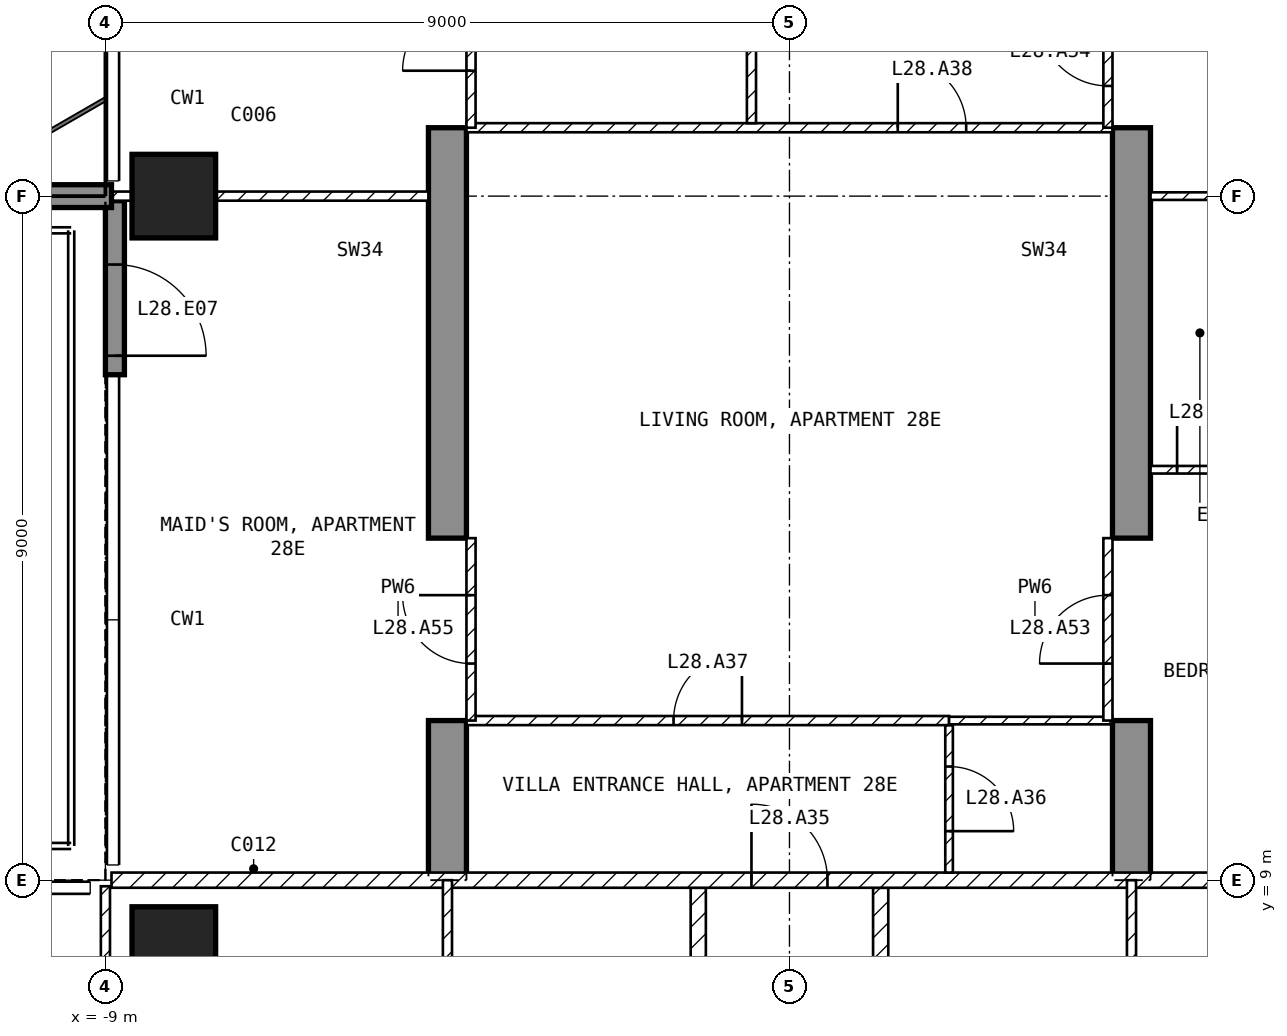
"""IFC4 building model, lengths in metres.
Left out: names, types, materials, properties, quantities, classifications, styles, units other than length and angle.
Written with IfcOpenShell. Run it as: python <this file> out.ifc"""

import sys

from ifc_helpers import new_model, si_unit, direction, frame, frame_2d, origin, origin_2d, place, context, subcontext, project, spatial, polyline, rectangle, outline, extrude, element, fill, save


model = new_model("IFC4")
c1 = context("Model", 3, precision=1e-05, world=origin(), true_north=direction((0.0, 1.0)))
c2 = subcontext(c1, "Body", "Model", "MODEL_VIEW")
j1 = project(units=[si_unit("LENGTHUNIT", "METRE"), si_unit("PLANEANGLEUNIT", "RADIAN")], contexts=[c1])
p1 = place(None, origin())
s1 = spatial("IfcSite", under=j1, at=p1, CompositionType="ELEMENT")
p2 = place(p1, origin())
s2 = spatial("IfcBuilding", under=s1, at=p2, CompositionType="ELEMENT")
p3 = place(p2, frame((0.0, 0.0, 119.9)))
s3 = spatial("IfcBuildingStorey", under=s2, at=p3, CompositionType="ELEMENT", Elevation=119.9)
for number, where, z_axis, x_axis in (
    (1, (-8.1, 8.1, -0.25), (0.0, 0.0, 1.0), (1.0, 0.0, 0.0)),
    (2, (-8.1, 18.0, -0.25), (0.0, 0.0, 1.0), (1.0, 0.0, 0.0)),
):
    element("IfcColumn", number, at=place(p3, frame(where, z_axis=z_axis, x_axis=x_axis)), inside=s3, PredefinedType="COLUMN", context=c2, shape_type="SweptSolid", body=[
        extrude(rectangle(XDim=1.1, YDim=1.1, at=origin_2d()), origin(), (0.0, 0.0, 1.0), 3.5),
    ])
for number, where, z_axis, x_axis in (
    (3, (-4.75, 9.0, -0.25), (1.0, 0.0, 0.0), (0.0, 1.0, 0.0)),
    (4, (4.25, 9.0, -0.25), (1.0, 0.0, 0.0), (0.0, 1.0, 0.0)),
):
    element("IfcWall", number, at=place(p3, frame(where, z_axis=z_axis, x_axis=x_axis)), inside=s3, PredefinedType="SHEAR", context=c2, shape_type="SweptSolid", body=[
        extrude(outline(polyline([(0.0, 0.0), (2.1, 0.0), (2.1, 2.65), (4.5, 2.65), (4.5, 0.0), (9.9, 0.0), (9.9, 2.65), (12.3, 2.65), (12.3, 0.0), (16.55, 0.0), (16.55, 3.5), (0.0, 3.5), (0.0, 0.0)])), origin(), (0.0, 0.0, 1.0), 0.5),
    ])
p4 = place(p3, frame((-8.875, 17.94, 0.0), z_axis=(0.0, 0.0, 1.0), x_axis=(0.0, -1.0, 0.0)))
e5 = element("IfcWall", 5, at=p4, inside=s3, PredefinedType="SOLIDWALL", context=c2, shape_type="SweptSolid", body=[
    extrude(rectangle(XDim=2.29, YDim=0.25, at=frame_2d((1.145, 0.0))), origin(), (0.0, 0.0, 1.0), 3.25),
])
p5 = place(p4, frame((0.84, 0.0, 0.0)))
e6 = element("IfcOpeningElement", 6, at=p5, cuts=e5, PredefinedType="OPENING", context=c2, shape_type="SweptSolid", body=[
    extrude(rectangle(XDim=1.2, YDim=2.4, at=frame_2d((0.6, 1.2))), frame((0.0, 0.135, 0.0), z_axis=(0.0, -1.0, 0.0), x_axis=(1.0, 0.0, 0.0)), (0.0, 0.0, 1.0), 0.27),
])
p6 = place(p3, frame((-8.92, 18.0, 0.0), z_axis=(0.0, 0.0, 1.0), x_axis=(-1.0, 0.0, 0.0)))
e7 = element("IfcWall", 7, at=p6, inside=s3, PredefinedType="SOLIDWALL", context=c2, shape_type="SweptSolid", body=[
    extrude(rectangle(XDim=2.82, YDim=0.3, at=frame_2d((1.41, 0.0))), origin(), (0.0, 0.0, 1.0), 3.25),
])
for number, where, z_axis, x_axis in (
    (8, (1.2, 8.9, 0.0), (0.0, 0.0, 1.0), (0.0, -1.0, 0.0)),
    (9, (-1.2, 4.6, 0.0), (0.0, 0.0, 1.0), (0.0, 1.0, 0.0)),
):
    element("IfcWall", number, at=place(p3, frame(where, z_axis=z_axis, x_axis=x_axis)), inside=s3, PredefinedType="PARTITIONING", context=c2, shape_type="SweptSolid", body=[
        extrude(rectangle(XDim=4.3, YDim=0.2, at=frame_2d((2.15, 0.0))), origin(), (0.0, 0.0, 1.0), 3.25),
    ])
p7 = place(p3, frame((-8.92, 9.0, 0.0), z_axis=(0.0, 0.0, 1.0), x_axis=(1.0, 0.0, 0.0)))
e10 = element("IfcWall", 10, at=p7, inside=s3, PredefinedType="PARTITIONING", context=c2, shape_type="SweptSolid", body=[
    extrude(rectangle(XDim=17.84, YDim=0.2, at=frame_2d((8.92, 0.0))), origin(), (0.0, 0.0, 1.0), 3.25),
])
p8 = place(p7, frame((8.42, 0.0, 0.0)))
e11 = element("IfcOpeningElement", 11, at=p8, cuts=e10, PredefinedType="OPENING", context=c2, shape_type="SweptSolid", body=[
    extrude(rectangle(XDim=1.0, YDim=2.1, at=frame_2d((0.5, 1.05))), frame((0.0, 0.11, 0.0), z_axis=(0.0, -1.0, 0.0), x_axis=(1.0, 0.0, 0.0)), (0.0, 0.0, 1.0), 0.22),
])
p9 = place(p3, frame((4.5, 4.5, 0.0), z_axis=(0.0, 0.0, 1.0), x_axis=(0.0, 1.0, 0.0)))
e12 = element("IfcWall", 12, at=p9, inside=s3, PredefinedType="PARTITIONING", context=c2, shape_type="SweptSolid", body=[
    extrude(rectangle(XDim=4.5, YDim=0.12, at=frame_2d((2.25, 0.0))), origin(), (0.0, 0.0, 1.0), 3.25),
])
p10 = place(p9, frame((0.24, 0.0, 0.0)))
e13 = element("IfcOpeningElement", 13, at=p10, cuts=e12, PredefinedType="OPENING", context=c2, shape_type="SweptSolid", body=[
    extrude(rectangle(XDim=0.9, YDim=2.1, at=frame_2d((0.45, 1.05))), frame((0.0, 0.07, 0.0), z_axis=(0.0, -1.0, 0.0), x_axis=(1.0, 0.0, 0.0)), (0.0, 0.0, 1.0), 0.14),
])
p11 = place(p3, frame((-9.0, 8.92, 0.0), z_axis=(0.0, 0.0, 1.0), x_axis=(0.0, -1.0, 0.0)))
e14 = element("IfcWall", 14, at=p11, inside=s3, PredefinedType="PARTITIONING", context=c2, shape_type="SweptSolid", body=[
    extrude(rectangle(XDim=7.62, YDim=0.12, at=frame_2d((3.81, 0.0))), origin(), (0.0, 0.0, 1.0), 3.25),
])
p12 = place(p11, frame((2.52, 0.0, 0.0)))
e15 = element("IfcOpeningElement", 15, at=p12, cuts=e14, PredefinedType="OPENING", context=c2, shape_type="SweptSolid", body=[
    extrude(rectangle(XDim=0.9, YDim=2.1, at=frame_2d((0.45, 1.05))), frame((0.0, 0.07, 0.0), z_axis=(0.0, -1.0, 0.0), x_axis=(1.0, 0.0, 0.0)), (0.0, 0.0, 1.0), 0.14),
])
p13 = place(p3, frame((-4.5, 9.0, 0.0), z_axis=(0.0, 0.0, 1.0), x_axis=(0.0, -1.0, 0.0)))
e16 = element("IfcWall", 16, at=p13, inside=s3, PredefinedType="PARTITIONING", context=c2, shape_type="SweptSolid", body=[
    extrude(rectangle(XDim=4.5, YDim=0.12, at=frame_2d((2.25, 0.0))), origin(), (0.0, 0.0, 1.0), 3.25),
])
p14 = place(p13, frame((1.8, 0.0, 0.0)))
e17 = element("IfcOpeningElement", 17, at=p14, cuts=e16, PredefinedType="OPENING", context=c2, shape_type="SweptSolid", body=[
    extrude(rectangle(XDim=0.9, YDim=2.1, at=frame_2d((0.45, 1.05))), frame((0.0, 0.07, 0.0), z_axis=(0.0, -1.0, 0.0), x_axis=(1.0, 0.0, 0.0)), (0.0, 0.0, 1.0), 0.14),
])
p15 = place(p3, frame((2.1, 11.04, 0.0), z_axis=(0.0, 0.0, 1.0), x_axis=(0.0, -1.0, 0.0)))
e18 = element("IfcWall", 18, at=p15, inside=s3, PredefinedType="PARTITIONING", context=c2, shape_type="SweptSolid", body=[
    extrude(rectangle(XDim=1.94, YDim=0.1, at=frame_2d((0.97, 0.0))), origin(), (0.0, 0.0, 1.0), 3.25),
])
p16 = place(p15, frame((0.545, 0.0, 0.0)))
e19 = element("IfcOpeningElement", 19, at=p16, cuts=e18, PredefinedType="OPENING", context=c2, shape_type="SweptSolid", body=[
    extrude(rectangle(XDim=0.85, YDim=2.1, at=frame_2d((0.425, 1.05))), frame((0.0, 0.06, 0.0), z_axis=(0.0, -1.0, 0.0), x_axis=(1.0, 0.0, 0.0)), (0.0, 0.0, 1.0), 0.12),
])
p17 = place(p3, frame((-4.25, 11.1, 0.0), z_axis=(0.0, 0.0, 1.0), x_axis=(1.0, 0.0, 0.0)))
e20 = element("IfcWall", 20, at=p17, inside=s3, PredefinedType="PARTITIONING", context=c2, shape_type="SweptSolid", body=[
    extrude(rectangle(XDim=6.35, YDim=0.12, at=frame_2d((3.175, 0.0))), origin(), (0.0, 0.0, 1.0), 3.25),
])
p18 = place(p17, frame((2.725, 0.0, 0.0)))
e21 = element("IfcOpeningElement", 21, at=p18, cuts=e20, PredefinedType="OPENING", context=c2, shape_type="SweptSolid", body=[
    extrude(rectangle(XDim=0.9, YDim=2.1, at=frame_2d((0.45, 1.05))), frame((0.0, 0.07, 0.0), z_axis=(0.0, -1.0, 0.0), x_axis=(1.0, 0.0, 0.0)), (0.0, 0.0, 1.0), 0.14),
])
p19 = place(p3, frame((2.1, 11.1, 0.0), z_axis=(0.0, 0.0, 1.0), x_axis=(1.0, 0.0, 0.0)))
e22 = element("IfcWall", 22, at=p19, inside=s3, PredefinedType="PARTITIONING", context=c2, shape_type="SweptSolid", body=[
    extrude(rectangle(XDim=2.15, YDim=0.1, at=frame_2d((1.075, 0.0))), origin(), (0.0, 0.0, 1.0), 3.25),
])
p20 = place(p3, frame((-4.25, 18.9, 0.0), z_axis=(0.0, 0.0, 1.0), x_axis=(1.0, 0.0, 0.0)))
e23 = element("IfcWall", 23, at=p20, inside=s3, PredefinedType="PARTITIONING", context=c2, shape_type="SweptSolid", body=[
    extrude(rectangle(XDim=8.5, YDim=0.12, at=frame_2d((4.25, 0.0))), origin(), (0.0, 0.0, 1.0), 3.25),
])
p21 = place(p20, frame((5.675, 0.0, 0.0)))
e24 = element("IfcOpeningElement", 24, at=p21, cuts=e23, PredefinedType="OPENING", context=c2, shape_type="SweptSolid", body=[
    extrude(rectangle(XDim=0.9, YDim=2.1, at=frame_2d((0.45, 1.05))), frame((0.0, 0.07, 0.0), z_axis=(0.0, -1.0, 0.0), x_axis=(1.0, 0.0, 0.0)), (0.0, 0.0, 1.0), 0.14),
])
p22 = place(p3, frame((-0.5, 18.96, 0.0), z_axis=(0.0, 0.0, 1.0), x_axis=(0.0, 1.0, 0.0)))
e25 = element("IfcWall", 25, at=p22, inside=s3, PredefinedType="PARTITIONING", context=c2, shape_type="SweptSolid", body=[
    extrude(rectangle(XDim=4.38, YDim=0.12, at=frame_2d((2.19, 0.0))), origin(), (0.0, 0.0, 1.0), 3.25),
])
p23 = place(p22, frame((1.74, 0.0, 0.0)))
e26 = element("IfcOpeningElement", 26, at=p23, cuts=e25, PredefinedType="OPENING", context=c2, shape_type="SweptSolid", body=[
    extrude(rectangle(XDim=0.9, YDim=2.1, at=frame_2d((0.45, 1.05))), frame((0.0, 0.07, 0.0), z_axis=(0.0, -1.0, 0.0), x_axis=(1.0, 0.0, 0.0)), (0.0, 0.0, 1.0), 0.14),
])
p24 = place(p3, frame((4.75, 14.4, 0.0), z_axis=(0.0, 0.0, 1.0), x_axis=(1.0, 0.0, 0.0)))
e27 = element("IfcWall", 27, at=p24, inside=s3, PredefinedType="PARTITIONING", context=c2, shape_type="SweptSolid", body=[
    extrude(rectangle(XDim=1.6, YDim=0.1, at=frame_2d((0.8, 0.0))), origin(), (0.0, 0.0, 1.0), 3.25),
])
p25 = place(p24, frame((0.35, 0.0, 0.0)))
e28 = element("IfcOpeningElement", 28, at=p25, cuts=e27, PredefinedType="OPENING", context=c2, shape_type="SweptSolid", body=[
    extrude(rectangle(XDim=0.85, YDim=2.1, at=frame_2d((0.425, 1.05))), frame((0.0, 0.06, 0.0), z_axis=(0.0, -1.0, 0.0), x_axis=(1.0, 0.0, 0.0)), (0.0, 0.0, 1.0), 0.12),
])
p26 = place(p3, frame((4.75, 18.0, 0.0), z_axis=(0.0, 0.0, 1.0), x_axis=(1.0, 0.0, 0.0)))
e29 = element("IfcWall", 29, at=p26, inside=s3, PredefinedType="PARTITIONING", context=c2, shape_type="SweptSolid", body=[
    extrude(rectangle(XDim=1.55, YDim=0.1, at=frame_2d((0.775, 0.0))), origin(), (0.0, 0.0, 1.0), 2.414),
])
p27 = place(p3, frame((-8.92, 18.0, 0.0), z_axis=(0.0, 0.0, 1.0), x_axis=(1.0, 0.0, 0.0)))
e30 = element("IfcWall", 30, at=p27, inside=s3, PredefinedType="PARTITIONING", context=c2, shape_type="SweptSolid", body=[
    extrude(rectangle(XDim=4.17, YDim=0.12, at=frame_2d((2.085, 0.0))), origin(), (0.0, 0.0, 1.0), 2.414),
])
p28 = place(p3, frame((4.19, 11.1, 0.0), z_axis=(0.0, 0.0, 1.0), x_axis=(0.0, 1.0, 0.0)))
e31 = element("IfcWall", 31, at=p28, inside=s3, PredefinedType="PARTITIONING", context=c2, shape_type="SweptSolid", body=[
    extrude(rectangle(XDim=2.4, YDim=0.12, at=frame_2d((1.2, 0.0))), origin(), (0.0, 0.0, 1.0), 2.4),
])
p29 = place(p28, frame((0.75, 0.0, 0.0)))
e32 = element("IfcOpeningElement", 32, at=p29, cuts=e31, PredefinedType="OPENING", context=c2, shape_type="SweptSolid", body=[
    extrude(rectangle(XDim=0.9, YDim=2.1, at=frame_2d((0.45, 1.05))), frame((0.0, 0.07, 0.0), z_axis=(0.0, -1.0, 0.0), x_axis=(1.0, 0.0, 0.0)), (0.0, 0.0, 1.0), 0.14),
])
p30 = place(p3, frame((4.19, 18.9, 0.0), z_axis=(0.0, 0.0, 1.0), x_axis=(0.0, 1.0, 0.0)))
e33 = element("IfcWall", 33, at=p30, inside=s3, PredefinedType="PARTITIONING", context=c2, shape_type="SweptSolid", body=[
    extrude(rectangle(XDim=2.4, YDim=0.12, at=frame_2d((1.2, 0.0))), origin(), (0.0, 0.0, 1.0), 2.4),
])
p31 = place(p30, frame((0.55, 0.0, 0.0)))
e34 = element("IfcOpeningElement", 34, at=p31, cuts=e33, PredefinedType="OPENING", context=c2, shape_type="SweptSolid", body=[
    extrude(rectangle(XDim=0.9, YDim=2.1, at=frame_2d((0.45, 1.05))), frame((0.0, 0.07, 0.0), z_axis=(0.0, -1.0, 0.0), x_axis=(1.0, 0.0, 0.0)), (0.0, 0.0, 1.0), 0.14),
])
p32 = place(p3, frame((-4.19, 11.1, 0.0), z_axis=(0.0, 0.0, 1.0), x_axis=(0.0, 1.0, 0.0)))
e35 = element("IfcWall", 35, at=p32, inside=s3, PredefinedType="PARTITIONING", context=c2, shape_type="SweptSolid", body=[
    extrude(rectangle(XDim=2.4, YDim=0.12, at=frame_2d((1.2, 0.0))), origin(), (0.0, 0.0, 1.0), 2.4),
])
p33 = place(p32, frame((0.75, 0.0, 0.0)))
e36 = element("IfcOpeningElement", 36, at=p33, cuts=e35, PredefinedType="OPENING", context=c2, shape_type="SweptSolid", body=[
    extrude(rectangle(XDim=0.9, YDim=2.1, at=frame_2d((0.45, 1.05))), frame((0.0, 0.07, 0.0), z_axis=(0.0, -1.0, 0.0), x_axis=(1.0, 0.0, 0.0)), (0.0, 0.0, 1.0), 0.14),
])
p34 = place(p3, frame((-4.19, 18.9, 0.0), z_axis=(0.0, 0.0, 1.0), x_axis=(0.0, 1.0, 0.0)))
e37 = element("IfcWall", 37, at=p34, inside=s3, PredefinedType="PARTITIONING", context=c2, shape_type="SweptSolid", body=[
    extrude(rectangle(XDim=2.4, YDim=0.12, at=frame_2d((1.2, 0.0))), origin(), (0.0, 0.0, 1.0), 2.4),
])
p35 = place(p34, frame((0.75, 0.0, 0.0)))
e38 = element("IfcOpeningElement", 38, at=p35, cuts=e37, PredefinedType="OPENING", context=c2, shape_type="SweptSolid", body=[
    extrude(rectangle(XDim=0.9, YDim=2.1, at=frame_2d((0.45, 1.05))), frame((0.0, 0.07, 0.0), z_axis=(0.0, -1.0, 0.0), x_axis=(1.0, 0.0, 0.0)), (0.0, 0.0, 1.0), 0.14),
])
p36 = place(p5, origin())
e39 = element("IfcDoor", 39, at=p36, inside=s3, OperationType="SINGLE_SWING_RIGHT", PredefinedType="DOOR", context=c2, shape_type="SweptSolid", body=[
    extrude(rectangle(XDim=1.2, YDim=2.4, at=frame_2d((0.6, 1.2))), frame((0.0, 0.025, 0.0), z_axis=(0.0, -1.0, 0.0), x_axis=(1.0, 0.0, 0.0)), (0.0, 0.0, 1.0), 0.05),
])
fill(e6, e39)
p37 = place(p8, origin())
e40 = element("IfcDoor", 40, at=p37, inside=s3, OperationType="SINGLE_SWING_LEFT", PredefinedType="DOOR", context=c2, shape_type="SweptSolid", body=[
    extrude(rectangle(XDim=1.0, YDim=2.1, at=frame_2d((0.5, 1.05))), frame((0.0, 0.025, 0.0), z_axis=(0.0, -1.0, 0.0), x_axis=(1.0, 0.0, 0.0)), (0.0, 0.0, 1.0), 0.05),
])
fill(e11, e40)
p38 = place(p16, origin())
e41 = element("IfcDoor", 41, at=p38, inside=s3, OperationType="SINGLE_SWING_RIGHT", PredefinedType="DOOR", context=c2, shape_type="SweptSolid", body=[
    extrude(rectangle(XDim=0.85, YDim=2.1, at=frame_2d((0.425, 1.05))), frame((0.0, 0.025, 0.0), z_axis=(0.0, -1.0, 0.0), x_axis=(1.0, 0.0, 0.0)), (0.0, 0.0, 1.0), 0.05),
])
fill(e19, e41)
p39 = place(p18, origin())
e42 = element("IfcDoor", 42, at=p39, inside=s3, OperationType="SINGLE_SWING_RIGHT", PredefinedType="DOOR", context=c2, shape_type="SweptSolid", body=[
    extrude(rectangle(XDim=0.9, YDim=2.1, at=frame_2d((0.45, 1.05))), frame((0.0, 0.025, 0.0), z_axis=(0.0, -1.0, 0.0), x_axis=(1.0, 0.0, 0.0)), (0.0, 0.0, 1.0), 0.05),
])
fill(e21, e42)
p40 = place(p21, origin())
e43 = element("IfcDoor", 43, at=p40, inside=s3, OperationType="SINGLE_SWING_LEFT", PredefinedType="DOOR", context=c2, shape_type="SweptSolid", body=[
    extrude(rectangle(XDim=0.9, YDim=2.1, at=frame_2d((0.45, 1.05))), frame((0.0, 0.025, 0.0), z_axis=(0.0, -1.0, 0.0), x_axis=(1.0, 0.0, 0.0)), (0.0, 0.0, 1.0), 0.05),
])
fill(e24, e43)
p41 = place(p25, origin())
e44 = element("IfcDoor", 44, at=p41, inside=s3, OperationType="SINGLE_SWING_LEFT", PredefinedType="DOOR", context=c2, shape_type="SweptSolid", body=[
    extrude(rectangle(XDim=0.85, YDim=2.1, at=frame_2d((0.425, 1.05))), frame((0.0, 0.025, 0.0), z_axis=(0.0, -1.0, 0.0), x_axis=(1.0, 0.0, 0.0)), (0.0, 0.0, 1.0), 0.05),
])
fill(e28, e44)
p42 = place(p29, origin())
e45 = element("IfcDoor", 45, at=p42, inside=s3, OperationType="SINGLE_SWING_LEFT", PredefinedType="DOOR", context=c2, shape_type="SweptSolid", body=[
    extrude(rectangle(XDim=0.9, YDim=2.1, at=frame_2d((0.45, 1.05))), frame((0.0, 0.025, 0.0), z_axis=(0.0, -1.0, 0.0), x_axis=(1.0, 0.0, 0.0)), (0.0, 0.0, 1.0), 0.05),
])
fill(e32, e45)
p43 = place(p31, origin())
e46 = element("IfcDoor", 46, at=p43, inside=s3, OperationType="SINGLE_SWING_RIGHT", PredefinedType="DOOR", context=c2, shape_type="SweptSolid", body=[
    extrude(rectangle(XDim=0.9, YDim=2.1, at=frame_2d((0.45, 1.05))), frame((0.0, 0.025, 0.0), z_axis=(0.0, -1.0, 0.0), x_axis=(1.0, 0.0, 0.0)), (0.0, 0.0, 1.0), 0.05),
])
fill(e34, e46)
p44 = place(p33, origin())
e47 = element("IfcDoor", 47, at=p44, inside=s3, OperationType="SINGLE_SWING_RIGHT", PredefinedType="DOOR", context=c2, shape_type="SweptSolid", body=[
    extrude(rectangle(XDim=0.9, YDim=2.1, at=frame_2d((0.45, 1.05))), frame((0.0, 0.025, 0.0), z_axis=(0.0, -1.0, 0.0), x_axis=(1.0, 0.0, 0.0)), (0.0, 0.0, 1.0), 0.05),
])
fill(e36, e47)
p45 = place(p35, origin())
e48 = element("IfcDoor", 48, at=p45, inside=s3, OperationType="SINGLE_SWING_LEFT", PredefinedType="DOOR", context=c2, shape_type="SweptSolid", body=[
    extrude(rectangle(XDim=0.9, YDim=2.1, at=frame_2d((0.45, 1.05))), frame((0.0, 0.025, 0.0), z_axis=(0.0, -1.0, 0.0), x_axis=(1.0, 0.0, 0.0)), (0.0, 0.0, 1.0), 0.05),
])
fill(e38, e48)
save(model, sys.argv[1])
